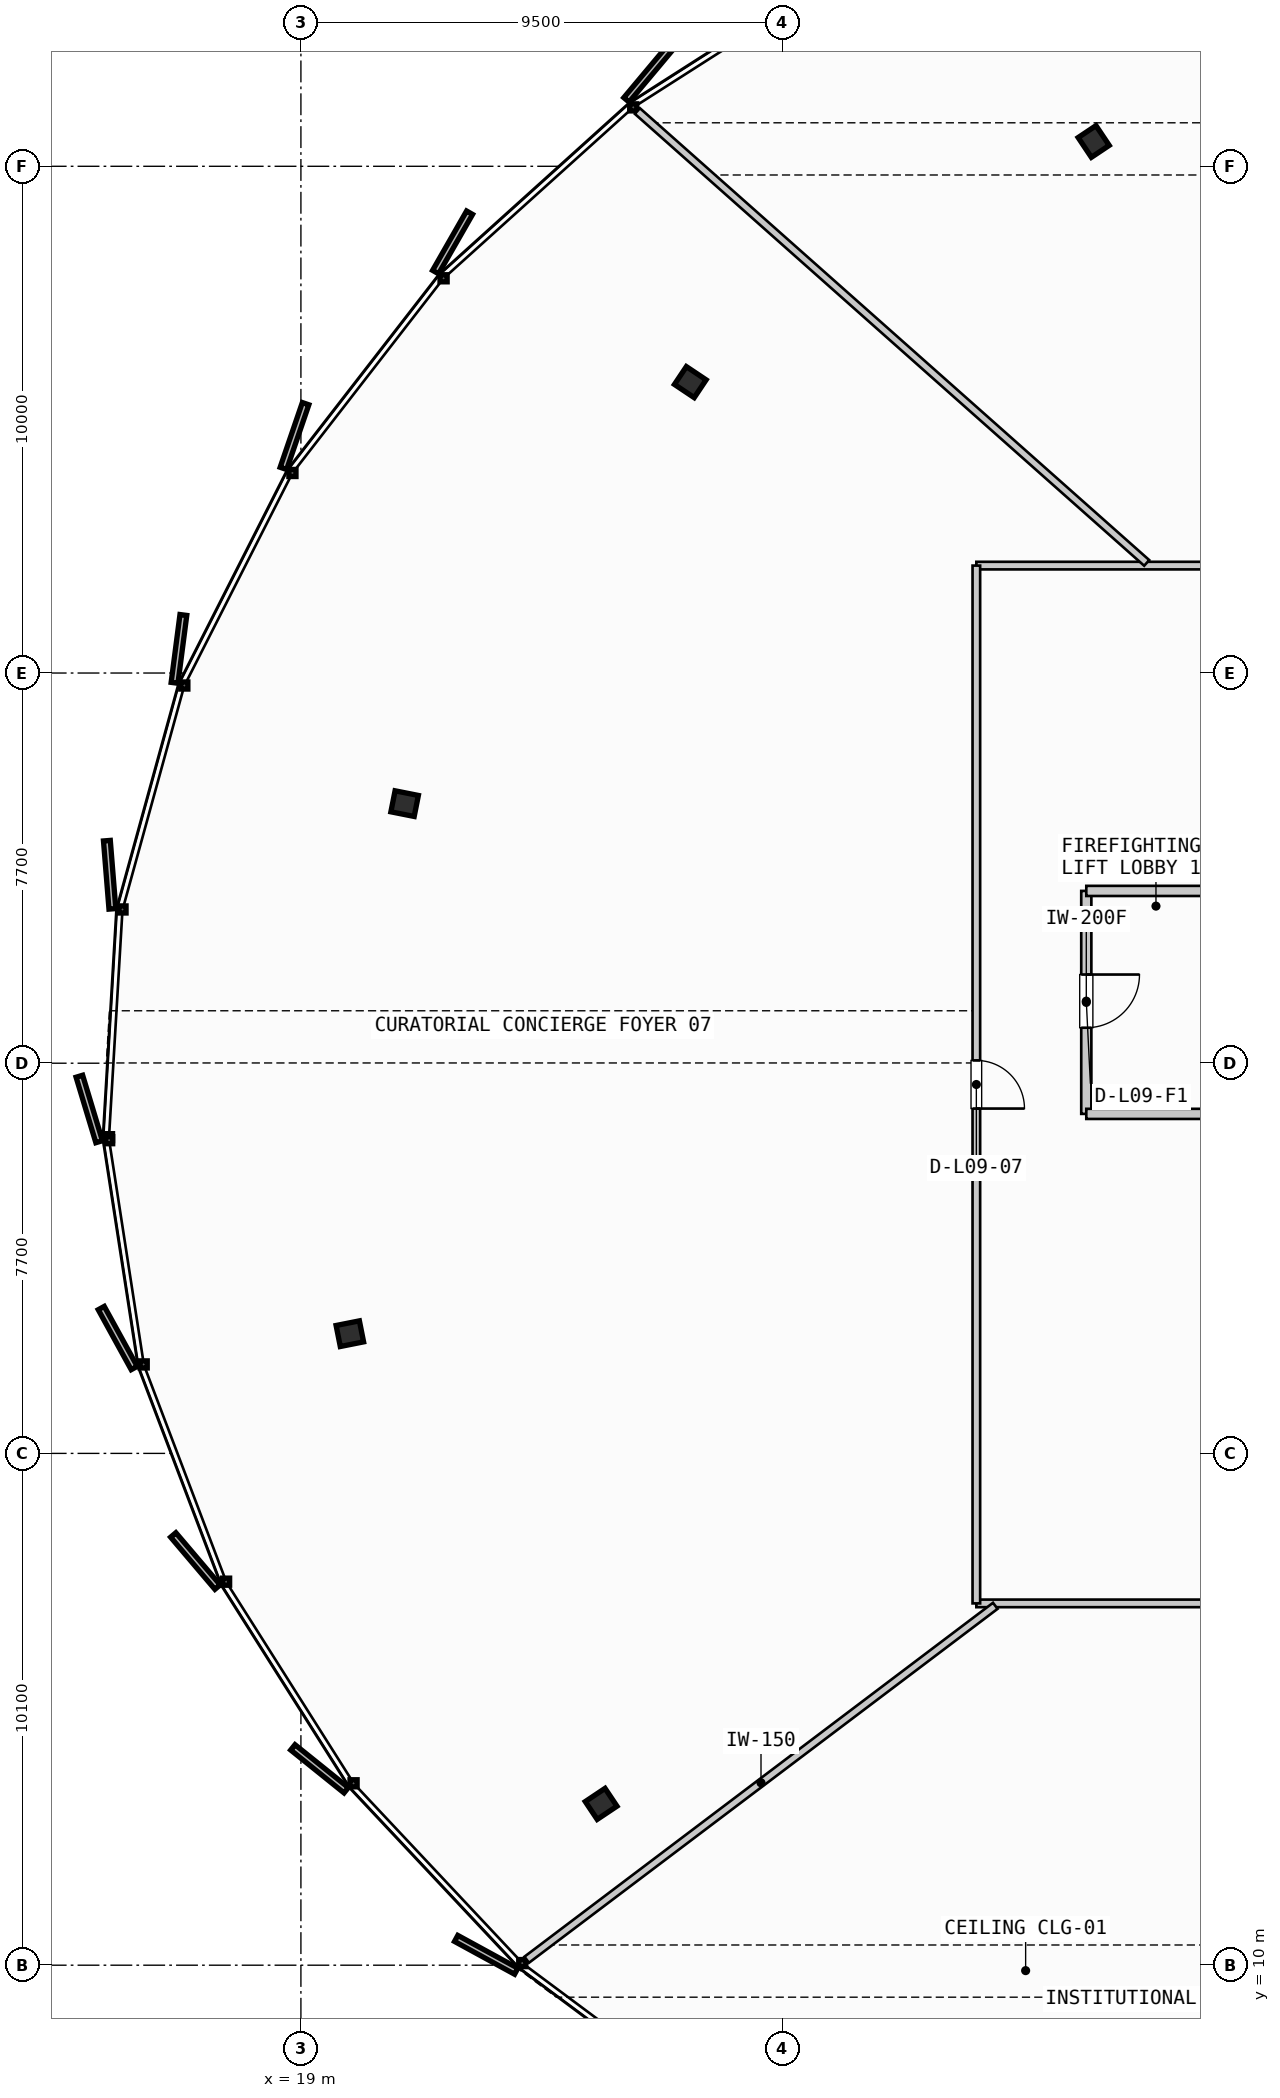
"""IFC4 building model, lengths in metres.
Left out: names, types, materials, properties, quantities, classifications, styles, units other than length and angle.
Written with IfcOpenShell. Run it as: python <this file> out.ifc"""

import sys

from ifc_helpers import new_model, si_unit, direction, frame, frame_2d, origin, origin_2d, place, context, subcontext, project, spatial, rectangle, i_section, extrude, source, transform, mapped, element, fill, save


model = new_model("IFC4")
c1 = context("Model", 3, precision=1e-05, world=origin(), true_north=direction((0.0, 1.0)))
c2 = subcontext(c1, "Body", "Model", "MODEL_VIEW")
j1 = project(units=[si_unit("LENGTHUNIT", "METRE"), si_unit("PLANEANGLEUNIT", "RADIAN")], contexts=[c1])
p1 = place(None, origin())
s1 = spatial("IfcSite", under=j1, at=p1, CompositionType="ELEMENT")
p2 = place(p1, origin())
s2 = spatial("IfcBuilding", under=s1, at=p2, CompositionType="ELEMENT")
p3 = place(p2, frame((0.0, 0.0, 41.0)))
s3 = spatial("IfcBuildingStorey", under=s2, at=p3, CompositionType="ELEMENT", Elevation=41.0)
m1 = source(origin(), c2, "Body", "SweptSolid", [
    extrude(i_section(OverallWidth=0.423, OverallDepth=0.469, WebThickness=0.051, FlangeThickness=0.081, FilletRadius=0.015, at=origin_2d()), origin(), (0.0, 0.0, 1.0), 3.55),
])
for number, where, z_axis, x_axis in (
    (1, (34.646, 45.99, 0.0), (0.0, 0.0, 1.0), (-0.556, 0.831, 0.0)),
    (2, (26.685, 41.241, 0.0), (0.0, 0.0, 1.0), (-0.831, 0.556, 0.0)),
    (3, (21.047, 32.923, 0.0), (0.0, 0.0, 1.0), (-0.981, 0.195, 0.0)),
    (4, (19.966, 22.462, 0.0), (0.0, 0.0, 1.0), (-0.981, -0.195, 0.0)),
    (5, (24.925, 13.183, 0.0), (0.0, 0.0, 1.0), (-0.831, -0.556, 0.0)),
):
    element("IfcColumn", number, at=place(p3, frame(where, z_axis=z_axis, x_axis=x_axis)), inside=s3, PredefinedType="COLUMN", context=c2, shape_type="MappedRepresentation", body=[
        mapped(m1, transform((0.0, 0.0, 0.0), scale=1.0)),
    ])
p4 = place(p3, frame((34.5, 31.2, 0.0), z_axis=(0.0, 0.0, 1.0), x_axis=(0.0, -1.0, 0.0)))
e6 = element("IfcWall", 6, at=p4, inside=s3, PredefinedType="PARTITIONING", context=c2, shape_type="SweptSolid", body=[
    extrude(rectangle(XDim=4.4, YDim=0.2, at=frame_2d((2.2, 0.0))), origin(), (0.0, 0.0, 1.0), 2.785),
])
p5 = place(p4, frame((1.65, 0.0, 0.0)))
e7 = element("IfcOpeningElement", 7, at=p5, cuts=e6, PredefinedType="OPENING", context=c2, shape_type="SweptSolid", body=[
    extrude(rectangle(XDim=1.05, YDim=2.15, at=frame_2d((0.525, 1.075))), frame((0.0, 0.11, 0.0), z_axis=(0.0, -1.0, 0.0), x_axis=(1.0, 0.0, 0.0)), (0.0, 0.0, 1.0), 0.22),
])
for number, where, z_axis, x_axis in (
    (8, (34.5, 26.8, 0.0), (0.0, 0.0, 1.0), (1.0, 0.0, 0.0)),
    (9, (34.5, 31.2, 0.0), (0.0, 0.0, 1.0), (1.0, 0.0, 0.0)),
):
    element("IfcWall", number, at=place(p3, frame(where, z_axis=z_axis, x_axis=x_axis)), inside=s3, PredefinedType="PARTITIONING", context=c2, shape_type="SweptSolid", body=[
        extrude(rectangle(XDim=3.14, YDim=0.2, at=frame_2d((1.57, 0.0))), origin(), (0.0, 0.0, 1.0), 2.785),
    ])
p6 = place(p3, frame((32.33, 17.14, 0.0), z_axis=(0.0, 0.0, 1.0), x_axis=(1.0, 0.0, 0.0)))
e10 = element("IfcWall", 10, at=p6, inside=s3, PredefinedType="PARTITIONING", context=c2, shape_type="SweptSolid", body=[
    extrude(rectangle(XDim=30.5, YDim=0.15, at=frame_2d((15.25, 0.0))), origin(), (0.0, 0.0, 1.0), 2.785),
])
p7 = place(p6, frame((7.302, 0.0, 0.0)))
e11 = element("IfcOpeningElement", 11, at=p7, cuts=e10, PredefinedType="OPENING", context=c2, shape_type="SweptSolid", body=[
    extrude(rectangle(XDim=0.95, YDim=2.15, at=frame_2d((0.475, 1.075))), frame((0.0, 0.085, 0.0), z_axis=(0.0, -1.0, 0.0), x_axis=(1.0, 0.0, 0.0)), (0.0, 0.0, 1.0), 0.17),
])
p8 = place(p6, frame((21.971, 0.0, 0.0)))
e12 = element("IfcOpeningElement", 12, at=p8, cuts=e10, PredefinedType="OPENING", context=c2, shape_type="SweptSolid", body=[
    extrude(rectangle(XDim=0.95, YDim=2.15, at=frame_2d((0.475, 1.075))), frame((0.0, 0.085, 0.0), z_axis=(0.0, -1.0, 0.0), x_axis=(1.0, 0.0, 0.0)), (0.0, 0.0, 1.0), 0.17),
])
p9 = place(p3, frame((62.83, 37.62, 0.0), z_axis=(0.0, 0.0, 1.0), x_axis=(-1.0, 0.0, 0.0)))
e13 = element("IfcWall", 13, at=p9, inside=s3, PredefinedType="PARTITIONING", context=c2, shape_type="SweptSolid", body=[
    extrude(rectangle(XDim=30.5, YDim=0.15, at=frame_2d((15.25, 0.0))), origin(), (0.0, 0.0, 1.0), 2.785),
])
p10 = place(p9, frame((5.908, 0.0, 0.0)))
e14 = element("IfcOpeningElement", 14, at=p10, cuts=e13, PredefinedType="OPENING", context=c2, shape_type="SweptSolid", body=[
    extrude(rectangle(XDim=0.95, YDim=2.15, at=frame_2d((0.475, 1.075))), frame((0.0, 0.085, 0.0), z_axis=(0.0, -1.0, 0.0), x_axis=(1.0, 0.0, 0.0)), (0.0, 0.0, 1.0), 0.17),
])
p11 = place(p9, frame((19.217, 0.0, 0.0)))
e15 = element("IfcOpeningElement", 15, at=p11, cuts=e13, PredefinedType="OPENING", context=c2, shape_type="SweptSolid", body=[
    extrude(rectangle(XDim=0.95, YDim=2.15, at=frame_2d((0.475, 1.075))), frame((0.0, 0.085, 0.0), z_axis=(0.0, -1.0, 0.0), x_axis=(1.0, 0.0, 0.0)), (0.0, 0.0, 1.0), 0.17),
])
p12 = place(p3, frame((32.33, 37.62, 0.0), z_axis=(0.0, 0.0, 1.0), x_axis=(0.0, -1.0, 0.0)))
e16 = element("IfcWall", 16, at=p12, inside=s3, PredefinedType="PARTITIONING", context=c2, shape_type="SweptSolid", body=[
    extrude(rectangle(XDim=20.48, YDim=0.15, at=frame_2d((10.24, 0.0))), origin(), (0.0, 0.0, 1.0), 2.785),
])
p13 = place(p12, frame((9.765, 0.0, 0.0)))
e17 = element("IfcOpeningElement", 17, at=p13, cuts=e16, PredefinedType="OPENING", context=c2, shape_type="SweptSolid", body=[
    extrude(rectangle(XDim=0.95, YDim=2.15, at=frame_2d((0.475, 1.075))), frame((0.0, 0.085, 0.0), z_axis=(0.0, -1.0, 0.0), x_axis=(1.0, 0.0, 0.0)), (0.0, 0.0, 1.0), 0.17),
])
p14 = place(p3, frame((32.704, 17.092, 0.0), z_axis=(0.0, 0.0, 1.0), x_axis=(-0.797998359946, -0.602659619954, 0.0)))
e18 = element("IfcWall", 18, at=p14, inside=s3, PredefinedType="PARTITIONING", context=c2, shape_type="SweptSolid", body=[
    extrude(rectangle(XDim=11.588, YDim=0.15, at=frame_2d((5.794, 0.0))), origin(), (0.0, 0.0, 1.0), 2.785),
])
p15 = place(p3, frame((35.692, 37.673, 0.0), z_axis=(0.0, 0.0, 1.0), x_axis=(-0.748055578895, 0.663636083169, 0.0)))
e19 = element("IfcWall", 19, at=p15, inside=s3, PredefinedType="PARTITIONING", context=c2, shape_type="SweptSolid", body=[
    extrude(rectangle(XDim=13.436, YDim=0.15, at=frame_2d((6.718, 0.0))), origin(), (0.0, 0.0, 1.0), 2.785),
])
m2 = source(origin(), c2, "Body", "SweptSolid", [
    extrude(rectangle(XDim=1.05, YDim=2.15, at=frame_2d((0.525, 1.075))), frame((0.0, 0.025, 0.0), z_axis=(0.0, -1.0, 0.0), x_axis=(1.0, 0.0, 0.0)), (0.0, 0.0, 1.0), 0.05),
])
p16 = place(p5, origin())
e20 = element("IfcDoor", 20, at=p16, inside=s3, OperationType="SINGLE_SWING_LEFT", PredefinedType="DOOR", context=c2, shape_type="MappedRepresentation", body=[
    mapped(m2, transform((0.0, 0.0, 0.0), scale=1.0)),
])
fill(e7, e20)
m3 = source(origin(), c2, "Body", "SweptSolid", [
    extrude(rectangle(XDim=0.95, YDim=2.15, at=frame_2d((0.475, 1.075))), frame((0.0, 0.025, 0.0), z_axis=(0.0, -1.0, 0.0), x_axis=(1.0, 0.0, 0.0)), (0.0, 0.0, 1.0), 0.05),
])
p17 = place(p13, origin())
e21 = element("IfcDoor", 21, at=p17, inside=s3, OperationType="SINGLE_SWING_RIGHT", PredefinedType="DOOR", context=c2, shape_type="MappedRepresentation", body=[
    mapped(m3, transform((0.0, 0.0, 0.0), scale=1.0)),
])
fill(e17, e21)
save(model, sys.argv[1])
